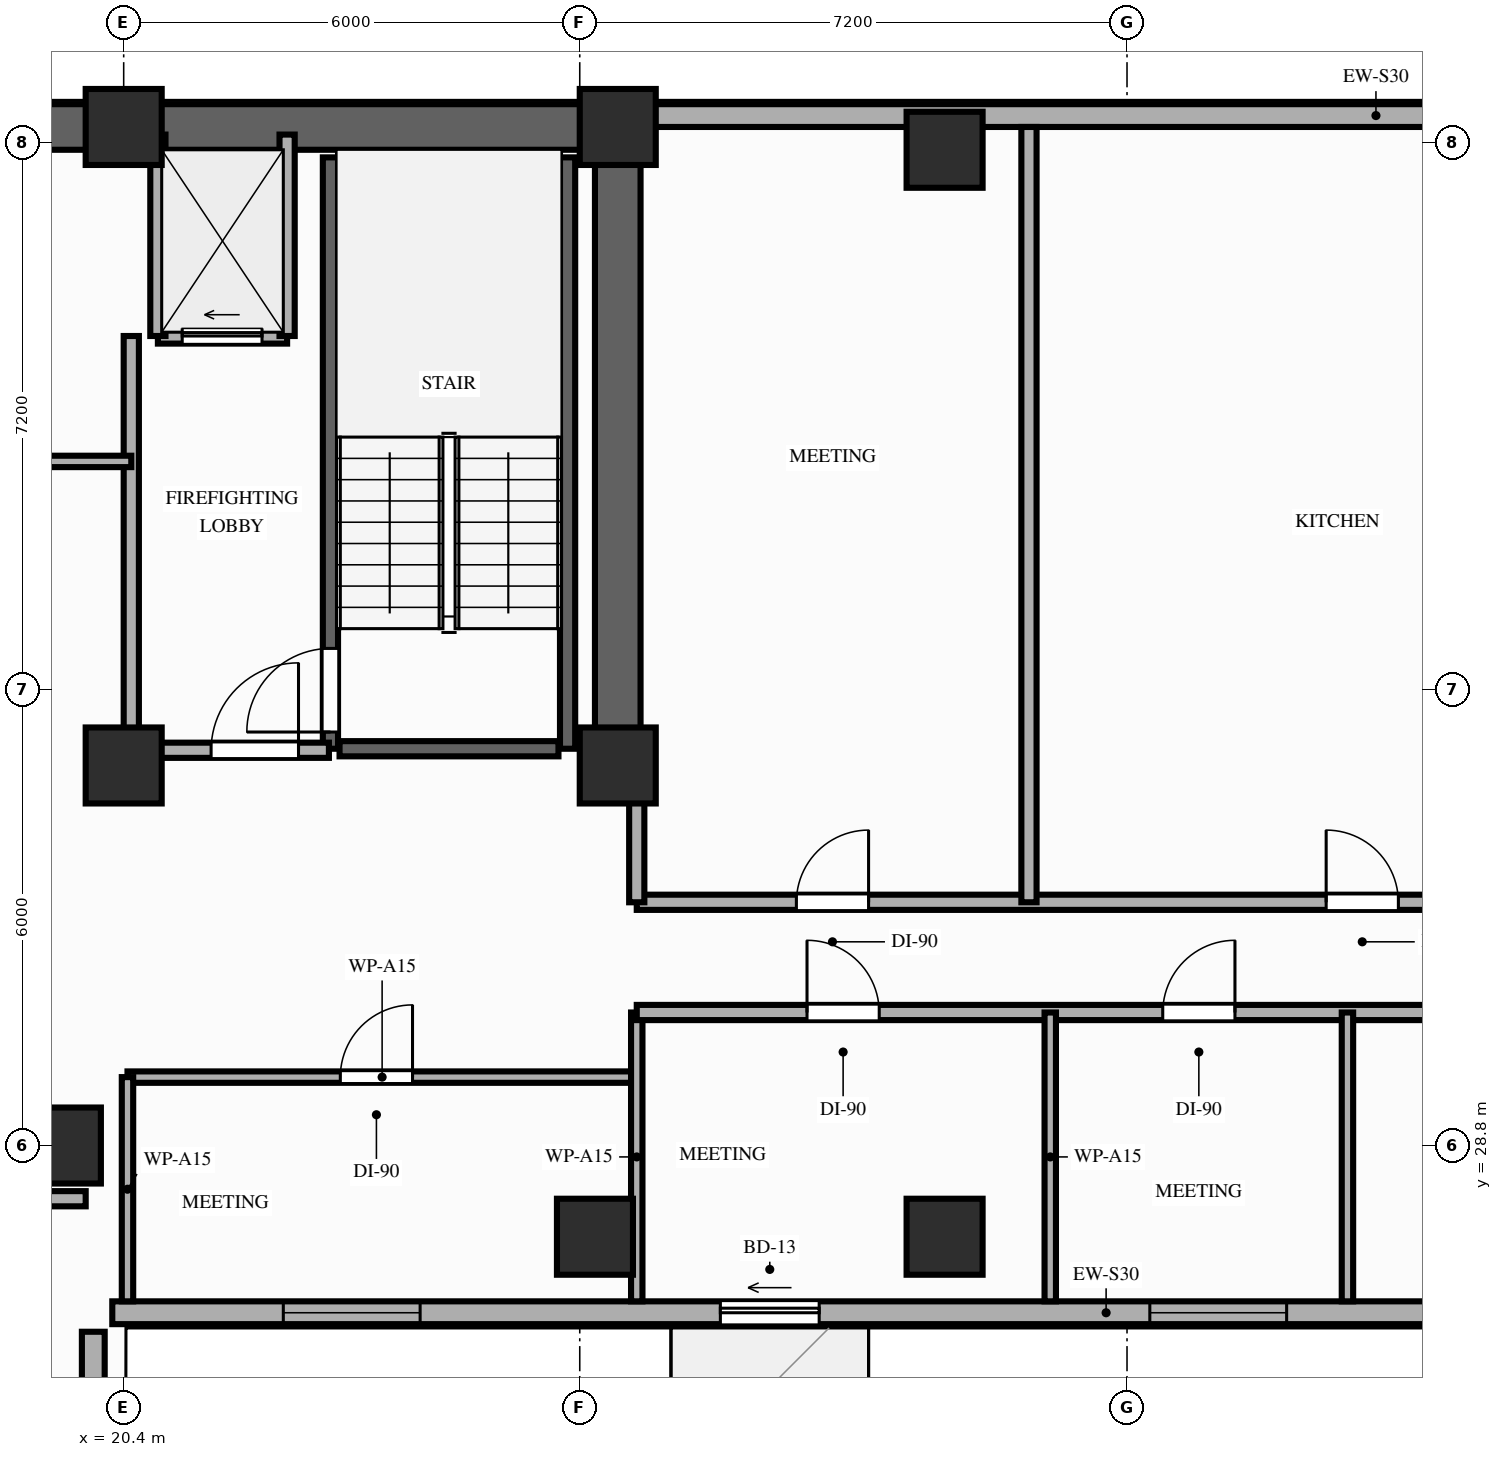
"""IFC4 building model, lengths in metres.
Left out: names, types, materials, properties, quantities, classifications, styles, units other than length and angle.
Written with IfcOpenShell. Run it as: python <this file> out.ifc"""

import sys

from ifc_helpers import new_model, si_unit, direction, frame, frame_2d, origin, origin_2d, place, context, subcontext, project, spatial, rectangle, extrude, element, fill, save


model = new_model("IFC4")
c1 = context("Model", 3, precision=1e-05, world=origin(), true_north=direction((0.0, 1.0)))
c2 = subcontext(c1, "Body", "Model", "MODEL_VIEW")
j1 = project(units=[si_unit("LENGTHUNIT", "METRE"), si_unit("PLANEANGLEUNIT", "RADIAN")], contexts=[c1])
p1 = place(None, origin())
s1 = spatial("IfcSite", under=j1, at=p1, CompositionType="ELEMENT")
p2 = place(p1, origin())
s2 = spatial("IfcBuilding", under=s1, at=p2, CompositionType="ELEMENT")
p3 = place(p2, frame((0.0, 0.0, 149.0)))
s3 = spatial("IfcBuildingStorey", under=s2, at=p3, CompositionType="ELEMENT", Elevation=149.0)
for number, where, z_axis, x_axis in (
    (1, (20.4, 33.8, 0.0), (0.0, 0.0, 1.0), (1.0, 0.0, 0.0)),
    (2, (26.9, 33.8, 0.0), (0.0, 0.0, 1.0), (1.0, 0.0, 0.0)),
    (3, (20.4, 42.2, 0.0), (0.0, 0.0, 1.0), (1.0, 0.0, 0.0)),
    (4, (26.9, 42.2, 0.0), (0.0, 0.0, 1.0), (1.0, 0.0, 0.0)),
    (5, (19.6, 28.8, 0.0), (0.0, 0.0, 1.0), (1.0, 0.0, 0.0)),
    (6, (26.6, 27.6, 0.0), (0.0, 0.0, 1.0), (1.0, 0.0, 0.0)),
    (7, (31.2, 27.6, 0.0), (0.0, 0.0, 1.0), (1.0, 0.0, 0.0)),
    (8, (31.2, 41.9, 0.0), (0.0, 0.0, 1.0), (1.0, 0.0, 0.0)),
):
    element("IfcColumn", number, at=place(p3, frame(where, z_axis=z_axis, x_axis=x_axis)), inside=s3, PredefinedType="COLUMN", context=c2, shape_type="SweptSolid", body=[
        extrude(rectangle(XDim=1.0, YDim=1.0, at=origin_2d()), origin(), (0.0, 0.0, 1.0), 3.2),
    ])
p4 = place(p3, frame((20.0, 8.8, 0.0), z_axis=(0.0, 0.0, 1.0), x_axis=(0.0, 1.0, 0.0)))
e9 = element("IfcWall", 9, at=p4, inside=s3, PredefinedType="STANDARD", context=c2, shape_type="SweptSolid", body=[
    extrude(rectangle(XDim=17.55, YDim=0.3, at=frame_2d((8.775, 0.0))), origin(), (0.0, 0.0, 1.0), 2.4),
])
p5 = place(p4, frame((5.6, 0.0, 0.85)))
e10 = element("IfcOpeningElement", 10, at=p5, cuts=e9, PredefinedType="OPENING", context=c2, shape_type="SweptSolid", body=[
    extrude(rectangle(XDim=1.8, YDim=1.3, at=frame_2d((0.9, 0.65))), frame((0.0, 0.16, 0.0), z_axis=(0.0, -1.0, 0.0), x_axis=(1.0, 0.0, 0.0)), (0.0, 0.0, 1.0), 0.32),
])
p6 = place(p3, frame((46.4, 42.35, 0.0), z_axis=(0.0, 0.0, 1.0), x_axis=(-1.0, 0.0, 0.0)))
e11 = element("IfcWall", 11, at=p6, inside=s3, PredefinedType="STANDARD", context=c2, shape_type="SweptSolid", body=[
    extrude(rectangle(XDim=19.05, YDim=0.3, at=frame_2d((9.525, 0.0))), origin(), (0.0, 0.0, 1.0), 2.4),
])
p7 = place(p3, frame((20.25, 26.6, 0.0), z_axis=(0.0, 0.0, 1.0), x_axis=(1.0, 0.0, 0.0)))
e12 = element("IfcWall", 12, at=p7, inside=s3, PredefinedType="STANDARD", context=c2, shape_type="SweptSolid", body=[
    extrude(rectangle(XDim=26.15, YDim=0.3, at=frame_2d((13.075, 0.0))), origin(), (0.0, 0.0, 1.0), 2.67),
])
p8 = place(p7, frame((8.0, 0.0, 0.0)))
e13 = element("IfcOpeningElement", 13, at=p8, cuts=e12, PredefinedType="OPENING", context=c2, shape_type="SweptSolid", body=[
    extrude(rectangle(XDim=1.3, YDim=2.08, at=frame_2d((0.65, 1.04))), frame((0.0, 0.16, 0.0), z_axis=(0.0, -1.0, 0.0), x_axis=(1.0, 0.0, 0.0)), (0.0, 0.0, 1.0), 0.32),
])
p9 = place(p7, frame((22.5, 0.0, 0.0)))
e14 = element("IfcOpeningElement", 14, at=p9, cuts=e12, PredefinedType="OPENING", context=c2, shape_type="SweptSolid", body=[
    extrude(rectangle(XDim=1.3, YDim=2.08, at=frame_2d((0.65, 1.04))), frame((0.0, 0.16, 0.0), z_axis=(0.0, -1.0, 0.0), x_axis=(1.0, 0.0, 0.0)), (0.0, 0.0, 1.0), 0.32),
])
p10 = place(p7, frame((2.25, 0.0, 0.85)))
e15 = element("IfcOpeningElement", 15, at=p10, cuts=e12, PredefinedType="OPENING", context=c2, shape_type="SweptSolid", body=[
    extrude(rectangle(XDim=1.8, YDim=1.57, at=frame_2d((0.9, 0.785))), frame((0.0, 0.16, 0.0), z_axis=(0.0, -1.0, 0.0), x_axis=(1.0, 0.0, 0.0)), (0.0, 0.0, 1.0), 0.32),
])
p11 = place(p7, frame((13.65, 0.0, 0.85)))
e16 = element("IfcOpeningElement", 16, at=p11, cuts=e12, PredefinedType="OPENING", context=c2, shape_type="SweptSolid", body=[
    extrude(rectangle(XDim=1.8, YDim=1.57, at=frame_2d((0.9, 0.785))), frame((0.0, 0.16, 0.0), z_axis=(0.0, -1.0, 0.0), x_axis=(1.0, 0.0, 0.0)), (0.0, 0.0, 1.0), 0.32),
])
p12 = place(p3, frame((6.45, 42.2, 0.0), z_axis=(0.0, 0.0, 1.0), x_axis=(1.0, 0.0, 0.0)))
e17 = element("IfcWall", 17, at=p12, inside=s3, PredefinedType="SHEAR", context=c2, shape_type="SweptSolid", body=[
    extrude(rectangle(XDim=20.45, YDim=0.6, at=frame_2d((10.225, 0.0))), origin(), (0.0, 0.0, 1.0), 2.96),
])
p13 = place(p3, frame((26.9, 33.8, 0.0), z_axis=(0.0, 0.0, 1.0), x_axis=(0.0, 1.0, 0.0)))
e18 = element("IfcWall", 18, at=p13, inside=s3, PredefinedType="SHEAR", context=c2, shape_type="SweptSolid", body=[
    extrude(rectangle(XDim=7.95, YDim=0.6, at=frame_2d((3.975, 0.0))), origin(), (0.0, 0.0, 1.0), 2.96),
])
p14 = place(p3, frame((23.12, 34.02, 0.0), z_axis=(0.0, 0.0, 1.0), x_axis=(0.0, 1.0, 0.0)))
e19 = element("IfcWall", 19, at=p14, inside=s3, PredefinedType="SHEAR", context=c2, shape_type="SweptSolid", body=[
    extrude(rectangle(XDim=7.78, YDim=0.2, at=frame_2d((3.89, 0.0))), origin(), (0.0, 0.0, 1.0), 2.96),
])
p15 = place(p14, frame((0.22, 0.0, 0.0)))
e20 = element("IfcOpeningElement", 20, at=p15, cuts=e19, PredefinedType="OPENING", context=c2, shape_type="SweptSolid", body=[
    extrude(rectangle(XDim=1.1, YDim=2.15, at=frame_2d((0.55, 1.075))), frame((0.0, 0.11, 0.0), z_axis=(0.0, -1.0, 0.0), x_axis=(1.0, 0.0, 0.0)), (0.0, 0.0, 1.0), 0.22),
])
p16 = place(p3, frame((26.24, 34.02, 0.0), z_axis=(0.0, 0.0, 1.0), x_axis=(0.0, 1.0, 0.0)))
e21 = element("IfcWall", 21, at=p16, inside=s3, PredefinedType="SHEAR", context=c2, shape_type="SweptSolid", body=[
    extrude(rectangle(XDim=7.78, YDim=0.2, at=frame_2d((3.89, 0.0))), origin(), (0.0, 0.0, 1.0), 2.96),
])
p17 = place(p3, frame((23.24, 34.02, 0.0), z_axis=(0.0, 0.0, 1.0), x_axis=(1.0, 0.0, 0.0)))
e22 = element("IfcWall", 22, at=p17, inside=s3, PredefinedType="SHEAR", context=c2, shape_type="SweptSolid", body=[
    extrude(rectangle(XDim=2.88, YDim=0.2, at=frame_2d((1.44, 0.0))), origin(), (0.0, 0.0, 1.0), 2.96),
])
p18 = place(p3, frame((20.85, 39.45, 0.0), z_axis=(0.0, 0.0, 1.0), x_axis=(1.0, 0.0, 0.0)))
e23 = element("IfcWall", 23, at=p18, inside=s3, PredefinedType="MOVABLE", context=c2, shape_type="SweptSolid", body=[
    extrude(rectangle(XDim=1.7, YDim=0.2, at=frame_2d((0.85, 0.0))), origin(), (0.0, 0.0, 1.0), 2.96),
])
p19 = place(p18, frame((0.32, 0.0, 0.0)))
e24 = element("IfcOpeningElement", 24, at=p19, cuts=e23, PredefinedType="OPENING", context=c2, shape_type="SweptSolid", body=[
    extrude(rectangle(XDim=1.05, YDim=2.15, at=frame_2d((0.525, 1.075))), frame((0.0, 0.11, 0.0), z_axis=(0.0, -1.0, 0.0), x_axis=(1.0, 0.0, 0.0)), (0.0, 0.0, 1.0), 0.22),
])
for number, where, z_axis, x_axis in (
    (25, (20.85, 39.45, 0.0), (0.0, 0.0, 1.0), (0.0, 1.0, 0.0)),
    (26, (22.55, 39.45, 0.0), (0.0, 0.0, 1.0), (0.0, 1.0, 0.0)),
):
    element("IfcWall", number, at=place(p3, frame(where, z_axis=z_axis, x_axis=x_axis)), inside=s3, PredefinedType="MOVABLE", context=c2, shape_type="SweptSolid", body=[
        extrude(rectangle(XDim=2.65, YDim=0.2, at=frame_2d((1.325, 0.0))), origin(), (0.0, 0.0, 1.0), 2.4),
    ])
p20 = place(p3, frame((20.5, 34.0, 0.0), z_axis=(0.0, 0.0, 1.0), x_axis=(0.0, 1.0, 0.0)))
e27 = element("IfcWall", 27, at=p20, inside=s3, PredefinedType="PARTITIONING", context=c2, shape_type="SweptSolid", body=[
    extrude(rectangle(XDim=5.45, YDim=0.2, at=frame_2d((2.725, 0.0))), origin(), (0.0, 0.0, 1.0), 2.4),
])
p21 = place(p3, frame((20.5, 34.0, 0.0), z_axis=(0.0, 0.0, 1.0), x_axis=(1.0, 0.0, 0.0)))
e28 = element("IfcWall", 28, at=p21, inside=s3, PredefinedType="PARTITIONING", context=c2, shape_type="SweptSolid", body=[
    extrude(rectangle(XDim=2.6, YDim=0.2, at=frame_2d((1.3, 0.0))), origin(), (0.0, 0.0, 1.0), 2.4),
])
p22 = place(p21, frame((1.05, 0.0, 0.0)))
e29 = element("IfcOpeningElement", 29, at=p22, cuts=e28, PredefinedType="OPENING", context=c2, shape_type="SweptSolid", body=[
    extrude(rectangle(XDim=1.15, YDim=2.15, at=frame_2d((0.575, 1.075))), frame((0.0, 0.11, 0.0), z_axis=(0.0, -1.0, 0.0), x_axis=(1.0, 0.0, 0.0)), (0.0, 0.0, 1.0), 0.22),
])
p23 = place(p3, frame((12.9, 37.8, 0.0), z_axis=(0.0, 0.0, 1.0), x_axis=(1.0, 0.0, 0.0)))
e30 = element("IfcWall", 30, at=p23, inside=s3, PredefinedType="PARTITIONING", context=c2, shape_type="SweptSolid", body=[
    extrude(rectangle(XDim=7.6, YDim=0.15, at=frame_2d((3.8, 0.0))), origin(), (0.0, 0.0, 1.0), 2.96),
])
p24 = place(p23, frame((1.3, 0.0, 0.0)))
e31 = element("IfcOpeningElement", 31, at=p24, cuts=e30, PredefinedType="OPENING", context=c2, shape_type="SweptSolid", body=[
    extrude(rectangle(XDim=0.95, YDim=2.15, at=frame_2d((0.475, 1.075))), frame((0.0, 0.085, 0.0), z_axis=(0.0, -1.0, 0.0), x_axis=(1.0, 0.0, 0.0)), (0.0, 0.0, 1.0), 0.17),
])
p25 = place(p23, frame((5.1, 0.0, 0.0)))
e32 = element("IfcOpeningElement", 32, at=p25, cuts=e30, PredefinedType="OPENING", context=c2, shape_type="SweptSolid", body=[
    extrude(rectangle(XDim=0.95, YDim=2.15, at=frame_2d((0.475, 1.075))), frame((0.0, 0.085, 0.0), z_axis=(0.0, -1.0, 0.0), x_axis=(1.0, 0.0, 0.0)), (0.0, 0.0, 1.0), 0.17),
])
p26 = place(p3, frame((14.66, 28.1, 0.0), z_axis=(0.0, 0.0, 1.0), x_axis=(1.0, 0.0, 0.0)))
e33 = element("IfcWall", 33, at=p26, inside=s3, PredefinedType="PARTITIONING", context=c2, shape_type="SweptSolid", body=[
    extrude(rectangle(XDim=5.24, YDim=0.2, at=frame_2d((2.62, 0.0))), origin(), (0.0, 0.0, 1.0), 2.4),
])
p27 = place(p3, frame((20.45, 29.7, 0.0), z_axis=(0.0, 0.0, 1.0), x_axis=(1.0, 0.0, 0.0)))
e34 = element("IfcWall", 34, at=p27, inside=s3, PredefinedType="PARTITIONING", context=c2, shape_type="SweptSolid", body=[
    extrude(rectangle(XDim=6.7, YDim=0.15, at=frame_2d((3.35, 0.0))), origin(), (0.0, 0.0, 1.0), 2.96),
])
p28 = place(p27, frame((2.8, 0.0, 0.0)))
e35 = element("IfcOpeningElement", 35, at=p28, cuts=e34, PredefinedType="OPENING", context=c2, shape_type="SweptSolid", body=[
    extrude(rectangle(XDim=0.95, YDim=2.15, at=frame_2d((0.475, 1.075))), frame((0.0, 0.085, 0.0), z_axis=(0.0, -1.0, 0.0), x_axis=(1.0, 0.0, 0.0)), (0.0, 0.0, 1.0), 0.17),
])
p29 = place(p3, frame((20.45, 26.75, 0.0), z_axis=(0.0, 0.0, 1.0), x_axis=(0.0, 1.0, 0.0)))
e36 = element("IfcWall", 36, at=p29, inside=s3, PredefinedType="PARTITIONING", context=c2, shape_type="SweptSolid", body=[
    extrude(rectangle(XDim=2.95, YDim=0.15, at=frame_2d((1.475, 0.0))), origin(), (0.0, 0.0, 1.0), 2.4),
])
p30 = place(p3, frame((27.15, 26.75, 0.0), z_axis=(0.0, 0.0, 1.0), x_axis=(0.0, 1.0, 0.0)))
e37 = element("IfcWall", 37, at=p30, inside=s3, PredefinedType="PARTITIONING", context=c2, shape_type="SweptSolid", body=[
    extrude(rectangle(XDim=3.8, YDim=0.15, at=frame_2d((1.9, 0.0))), origin(), (0.0, 0.0, 1.0), 2.4),
])
p31 = place(p3, frame((27.15, 30.55, 0.0), z_axis=(0.0, 0.0, 1.0), x_axis=(1.0, 0.0, 0.0)))
e38 = element("IfcWall", 38, at=p31, inside=s3, PredefinedType="PARTITIONING", context=c2, shape_type="SweptSolid", body=[
    extrude(rectangle(XDim=13.95, YDim=0.2, at=frame_2d((6.975, 0.0))), origin(), (0.0, 0.0, 1.0), 2.4),
])
p32 = place(p31, frame((2.24, 0.0, 0.0)))
e39 = element("IfcOpeningElement", 39, at=p32, cuts=e38, PredefinedType="OPENING", context=c2, shape_type="SweptSolid", body=[
    extrude(rectangle(XDim=0.95, YDim=2.15, at=frame_2d((0.475, 1.075))), frame((0.0, 0.11, 0.0), z_axis=(0.0, -1.0, 0.0), x_axis=(1.0, 0.0, 0.0)), (0.0, 0.0, 1.0), 0.22),
])
p33 = place(p31, frame((6.92, 0.0, 0.0)))
e40 = element("IfcOpeningElement", 40, at=p33, cuts=e38, PredefinedType="OPENING", context=c2, shape_type="SweptSolid", body=[
    extrude(rectangle(XDim=0.95, YDim=2.15, at=frame_2d((0.475, 1.075))), frame((0.0, 0.11, 0.0), z_axis=(0.0, -1.0, 0.0), x_axis=(1.0, 0.0, 0.0)), (0.0, 0.0, 1.0), 0.22),
])
p34 = place(p31, frame((11.17, 0.0, 0.0)))
e41 = element("IfcOpeningElement", 41, at=p34, cuts=e38, PredefinedType="OPENING", context=c2, shape_type="SweptSolid", body=[
    extrude(rectangle(XDim=0.95, YDim=2.15, at=frame_2d((0.475, 1.075))), frame((0.0, 0.11, 0.0), z_axis=(0.0, -1.0, 0.0), x_axis=(1.0, 0.0, 0.0)), (0.0, 0.0, 1.0), 0.22),
])
p35 = place(p3, frame((27.15, 32.0, 0.0), z_axis=(0.0, 0.0, 1.0), x_axis=(1.0, 0.0, 0.0)))
e42 = element("IfcWall", 42, at=p35, inside=s3, PredefinedType="PARTITIONING", context=c2, shape_type="SweptSolid", body=[
    extrude(rectangle(XDim=13.95, YDim=0.2, at=frame_2d((6.975, 0.0))), origin(), (0.0, 0.0, 1.0), 2.4),
])
p36 = place(p35, frame((2.1, 0.0, 0.0)))
e43 = element("IfcOpeningElement", 43, at=p36, cuts=e42, PredefinedType="OPENING", context=c2, shape_type="SweptSolid", body=[
    extrude(rectangle(XDim=0.95, YDim=2.15, at=frame_2d((0.475, 1.075))), frame((0.0, 0.11, 0.0), z_axis=(0.0, -1.0, 0.0), x_axis=(1.0, 0.0, 0.0)), (0.0, 0.0, 1.0), 0.22),
])
p37 = place(p35, frame((9.07, 0.0, 0.0)))
e44 = element("IfcOpeningElement", 44, at=p37, cuts=e42, PredefinedType="OPENING", context=c2, shape_type="SweptSolid", body=[
    extrude(rectangle(XDim=0.95, YDim=2.15, at=frame_2d((0.475, 1.075))), frame((0.0, 0.11, 0.0), z_axis=(0.0, -1.0, 0.0), x_axis=(1.0, 0.0, 0.0)), (0.0, 0.0, 1.0), 0.22),
])
p38 = place(p3, frame((27.15, 32.0, 0.0), z_axis=(0.0, 0.0, 1.0), x_axis=(0.0, 1.0, 0.0)))
e45 = element("IfcWall", 45, at=p38, inside=s3, PredefinedType="PARTITIONING", context=c2, shape_type="SweptSolid", body=[
    extrude(rectangle(XDim=1.68, YDim=0.2, at=frame_2d((0.84, 0.0))), origin(), (0.0, 0.0, 1.0), 2.4),
])
for number, where, z_axis, x_axis in (
    (46, (32.59, 26.75, 0.0), (0.0, 0.0, 1.0), (0.0, 1.0, 0.0)),
    (47, (36.5, 26.75, 0.0), (0.0, 0.0, 1.0), (0.0, 1.0, 0.0)),
):
    element("IfcWall", number, at=place(p3, frame(where, z_axis=z_axis, x_axis=x_axis)), inside=s3, PredefinedType="PARTITIONING", context=c2, shape_type="SweptSolid", body=[
        extrude(rectangle(XDim=3.8, YDim=0.15, at=frame_2d((1.9, 0.0))), origin(), (0.0, 0.0, 1.0), 2.4),
    ])
p39 = place(p3, frame((32.31, 32.0, 0.0), z_axis=(0.0, 0.0, 1.0), x_axis=(0.0, 1.0, 0.0)))
e48 = element("IfcWall", 48, at=p39, inside=s3, PredefinedType="PARTITIONING", context=c2, shape_type="SweptSolid", body=[
    extrude(rectangle(XDim=10.2, YDim=0.2, at=frame_2d((5.1, 0.0))), origin(), (0.0, 0.0, 1.0), 2.4),
])
p40 = place(p8, origin())
e49 = element("IfcDoor", 49, at=p40, inside=s3, OperationType="SLIDING_TO_LEFT", PredefinedType="DOOR", context=c2, shape_type="SweptSolid", body=[
    extrude(rectangle(XDim=1.3, YDim=2.08, at=frame_2d((0.65, 1.04))), frame((0.0, 0.025, 0.0), z_axis=(0.0, -1.0, 0.0), x_axis=(1.0, 0.0, 0.0)), (0.0, 0.0, 1.0), 0.05),
])
fill(e13, e49)
p41 = place(p10, origin())
e50 = element("IfcWindow", 50, at=p41, inside=s3, PartitioningType="SINGLE_PANEL", PredefinedType="WINDOW", context=c2, shape_type="SweptSolid", body=[
    extrude(rectangle(XDim=1.8, YDim=1.57, at=frame_2d((0.9, 0.785))), frame((0.0, 0.03, 0.0), z_axis=(0.0, -1.0, 0.0), x_axis=(1.0, 0.0, 0.0)), (0.0, 0.0, 1.0), 0.06),
])
fill(e15, e50)
p42 = place(p11, origin())
e51 = element("IfcWindow", 51, at=p42, inside=s3, PartitioningType="SINGLE_PANEL", PredefinedType="WINDOW", context=c2, shape_type="SweptSolid", body=[
    extrude(rectangle(XDim=1.8, YDim=1.57, at=frame_2d((0.9, 0.785))), frame((0.0, 0.03, 0.0), z_axis=(0.0, -1.0, 0.0), x_axis=(1.0, 0.0, 0.0)), (0.0, 0.0, 1.0), 0.06),
])
fill(e16, e51)
p43 = place(p15, origin())
e52 = element("IfcDoor", 52, at=p43, inside=s3, OperationType="SINGLE_SWING_LEFT", PredefinedType="DOOR", context=c2, shape_type="SweptSolid", body=[
    extrude(rectangle(XDim=1.1, YDim=2.15, at=frame_2d((0.55, 1.075))), frame((0.0, 0.025, 0.0), z_axis=(0.0, -1.0, 0.0), x_axis=(1.0, 0.0, 0.0)), (0.0, 0.0, 1.0), 0.05),
])
fill(e20, e52)
p44 = place(p19, origin())
e53 = element("IfcDoor", 53, at=p44, inside=s3, OperationType="SLIDING_TO_LEFT", PredefinedType="DOOR", context=c2, shape_type="SweptSolid", body=[
    extrude(rectangle(XDim=1.05, YDim=2.15, at=frame_2d((0.525, 1.075))), frame((0.0, 0.025, 0.0), z_axis=(0.0, -1.0, 0.0), x_axis=(1.0, 0.0, 0.0)), (0.0, 0.0, 1.0), 0.05),
])
fill(e24, e53)
p45 = place(p22, origin())
e54 = element("IfcDoor", 54, at=p45, inside=s3, OperationType="SINGLE_SWING_RIGHT", PredefinedType="DOOR", context=c2, shape_type="SweptSolid", body=[
    extrude(rectangle(XDim=1.15, YDim=2.15, at=frame_2d((0.575, 1.075))), frame((0.0, 0.025, 0.0), z_axis=(0.0, -1.0, 0.0), x_axis=(1.0, 0.0, 0.0)), (0.0, 0.0, 1.0), 0.05),
])
fill(e29, e54)
p46 = place(p28, origin())
e55 = element("IfcDoor", 55, at=p46, inside=s3, OperationType="SINGLE_SWING_RIGHT", PredefinedType="DOOR", context=c2, shape_type="SweptSolid", body=[
    extrude(rectangle(XDim=0.95, YDim=2.15, at=frame_2d((0.475, 1.075))), frame((0.0, 0.025, 0.0), z_axis=(0.0, -1.0, 0.0), x_axis=(1.0, 0.0, 0.0)), (0.0, 0.0, 1.0), 0.05),
])
fill(e35, e55)
p47 = place(p32, origin())
e56 = element("IfcDoor", 56, at=p47, inside=s3, OperationType="SINGLE_SWING_LEFT", PredefinedType="DOOR", context=c2, shape_type="SweptSolid", body=[
    extrude(rectangle(XDim=0.95, YDim=2.15, at=frame_2d((0.475, 1.075))), frame((0.0, 0.025, 0.0), z_axis=(0.0, -1.0, 0.0), x_axis=(1.0, 0.0, 0.0)), (0.0, 0.0, 1.0), 0.05),
])
fill(e39, e56)
p48 = place(p33, origin())
e57 = element("IfcDoor", 57, at=p48, inside=s3, OperationType="SINGLE_SWING_RIGHT", PredefinedType="DOOR", context=c2, shape_type="SweptSolid", body=[
    extrude(rectangle(XDim=0.95, YDim=2.15, at=frame_2d((0.475, 1.075))), frame((0.0, 0.025, 0.0), z_axis=(0.0, -1.0, 0.0), x_axis=(1.0, 0.0, 0.0)), (0.0, 0.0, 1.0), 0.05),
])
fill(e40, e57)
p49 = place(p36, origin())
e58 = element("IfcDoor", 58, at=p49, inside=s3, OperationType="SINGLE_SWING_RIGHT", PredefinedType="DOOR", context=c2, shape_type="SweptSolid", body=[
    extrude(rectangle(XDim=0.95, YDim=2.15, at=frame_2d((0.475, 1.075))), frame((0.0, 0.025, 0.0), z_axis=(0.0, -1.0, 0.0), x_axis=(1.0, 0.0, 0.0)), (0.0, 0.0, 1.0), 0.05),
])
fill(e43, e58)
p50 = place(p37, origin())
e59 = element("IfcDoor", 59, at=p50, inside=s3, OperationType="SINGLE_SWING_LEFT", PredefinedType="DOOR", context=c2, shape_type="SweptSolid", body=[
    extrude(rectangle(XDim=0.95, YDim=2.15, at=frame_2d((0.475, 1.075))), frame((0.0, 0.025, 0.0), z_axis=(0.0, -1.0, 0.0), x_axis=(1.0, 0.0, 0.0)), (0.0, 0.0, 1.0), 0.05),
])
fill(e44, e59)
save(model, sys.argv[1])
